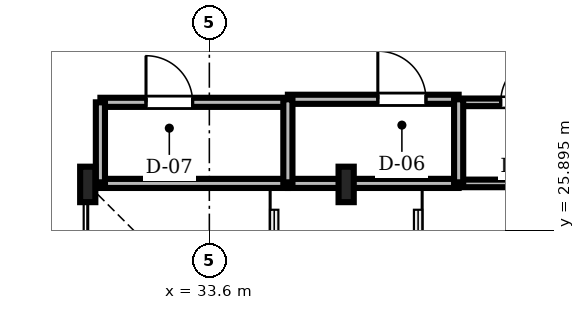
"""IFC4 building model, lengths in metres.
Left out: names, types, materials, properties, quantities, classifications, styles, units other than length and angle.
Written with IfcOpenShell. Run it as: python <this file> out.ifc"""

import sys

from ifc_helpers import new_model, si_unit, direction, frame, frame_2d, origin, origin_2d, place, context, subcontext, project, spatial, rectangle, i_section, extrude, source, transform, mapped, element, fill, save


model = new_model("IFC4")
c1 = context("Model", 3, precision=1e-05, world=origin(), true_north=direction((0.0, 1.0)))
c2 = subcontext(c1, "Body", "Model", "MODEL_VIEW")
j1 = project(units=[si_unit("LENGTHUNIT", "METRE"), si_unit("PLANEANGLEUNIT", "RADIAN")], contexts=[c1])
p1 = place(None, origin())
s1 = spatial("IfcSite", under=j1, at=p1, CompositionType="ELEMENT")
p2 = place(p1, origin())
s2 = spatial("IfcBuilding", under=s1, at=p2, CompositionType="ELEMENT")
p3 = place(p2, frame((0.0, 0.0, 172.2)))
s3 = spatial("IfcBuildingStorey", under=s2, at=p3, CompositionType="ELEMENT", Elevation=172.2)
m1 = source(origin(), c2, "Body", "SweptSolid", [
    extrude(i_section(OverallWidth=0.3, OverallDepth=0.7, WebThickness=0.017, FlangeThickness=0.032, FilletRadius=0.027, at=origin_2d()), origin(), (0.0, 0.0, 1.0), 4.78),
])
for number, where, z_axis, x_axis in (
    (1, (36.3, 26.8, 0.0), (0.0, 0.0, 1.0), (1.0, 0.0, 0.0)),
    (2, (31.2, 26.8, 0.0), (0.0, 0.0, 1.0), (1.0, 0.0, 0.0)),
):
    element("IfcColumn", number, at=place(p3, frame(where, z_axis=z_axis, x_axis=x_axis)), inside=s3, PredefinedType="COLUMN", context=c2, shape_type="MappedRepresentation", body=[
        mapped(m1, transform((0.0, 0.0, 0.0), scale=1.0)),
    ])
m2 = source(origin(), c2, "Body", "SweptSolid", [
    extrude(rectangle(XDim=3.7, YDim=0.18, at=frame_2d((1.85, 0.0))), origin(), (0.0, 0.0, 1.0), 4.412),
])
p4 = place(p3, frame((31.45, 28.42, 0.0), z_axis=(0.0, 0.0, 1.0), x_axis=(1.0, 0.0, 0.0)))
e3 = element("IfcWall", 3, at=p4, inside=s3, PredefinedType="PARTITIONING", context=c2, shape_type="MappedRepresentation", body=[
    mapped(m2, transform((0.0, 0.0, 0.0), scale=1.0)),
])
m3 = source(origin(), c2, "Body", "SweptSolid", [
    extrude(rectangle(XDim=0.92, YDim=2.1, at=frame_2d((0.46, 1.05))), frame((0.0, 0.1, 0.0), z_axis=(0.0, -1.0, 0.0), x_axis=(1.0, 0.0, 0.0)), (0.0, 0.0, 1.0), 0.2),
])
p5 = place(p4, frame((0.9, 0.0, 0.0)))
e4 = element("IfcOpeningElement", 4, at=p5, cuts=e3, PredefinedType="OPENING", context=c2, shape_type="MappedRepresentation", body=[
    mapped(m3, transform((0.0, 0.0, 0.0), scale=1.0)),
])
m4 = source(origin(), c2, "Body", "SweptSolid", [
    extrude(rectangle(XDim=3.37, YDim=0.18, at=frame_2d((1.685, 0.0))), origin(), (0.0, 0.0, 1.0), 4.78),
])
p6 = place(p3, frame((35.15, 28.48, 0.0), z_axis=(0.0, 0.0, 1.0), x_axis=(1.0, 0.0, 0.0)))
e5 = element("IfcWall", 5, at=p6, inside=s3, PredefinedType="PARTITIONING", context=c2, shape_type="MappedRepresentation", body=[
    mapped(m4, transform((0.0, 0.0, 0.0), scale=1.0)),
])
m5 = source(origin(), c2, "Body", "SweptSolid", [
    extrude(rectangle(XDim=0.95, YDim=2.15, at=frame_2d((0.475, 1.075))), frame((0.0, 0.1, 0.0), z_axis=(0.0, -1.0, 0.0), x_axis=(1.0, 0.0, 0.0)), (0.0, 0.0, 1.0), 0.2),
])
p7 = place(p6, frame((1.775, 0.0, 0.0)))
e6 = element("IfcOpeningElement", 6, at=p7, cuts=e5, PredefinedType="OPENING", context=c2, shape_type="MappedRepresentation", body=[
    mapped(m5, transform((0.0, 0.0, 0.0), scale=1.0)),
])
m6 = source(origin(), c2, "Body", "SweptSolid", [
    extrude(rectangle(XDim=3.0, YDim=0.15, at=frame_2d((1.5, 0.0))), origin(), (0.0, 0.0, 1.0), 4.78),
])
p8 = place(p3, frame((38.52, 28.42, 0.0), z_axis=(0.0, 0.0, 1.0), x_axis=(1.0, 0.0, 0.0)))
e7 = element("IfcWall", 7, at=p8, inside=s3, PredefinedType="PARTITIONING", context=c2, shape_type="MappedRepresentation", body=[
    mapped(m6, transform((0.0, 0.0, 0.0), scale=1.0)),
])
m7 = source(origin(), c2, "Body", "SweptSolid", [
    extrude(rectangle(XDim=0.92, YDim=2.1, at=frame_2d((0.46, 1.05))), frame((0.0, 0.085, 0.0), z_axis=(0.0, -1.0, 0.0), x_axis=(1.0, 0.0, 0.0)), (0.0, 0.0, 1.0), 0.17),
])
p9 = place(p8, frame((0.83, 0.0, 0.0)))
e8 = element("IfcOpeningElement", 8, at=p9, cuts=e7, PredefinedType="OPENING", context=c2, shape_type="MappedRepresentation", body=[
    mapped(m7, transform((0.0, 0.0, 0.0), scale=1.0)),
])
m8 = source(origin(), c2, "Body", "SweptSolid", [
    extrude(rectangle(XDim=3.7, YDim=0.18, at=frame_2d((1.85, 0.0))), origin(), (0.0, 0.0, 1.0), 4.322),
])
p10 = place(p3, frame((31.45, 26.82, 0.0), z_axis=(0.0, 0.0, 1.0), x_axis=(1.0, 0.0, 0.0)))
e9 = element("IfcWall", 9, at=p10, inside=s3, PredefinedType="PARTITIONING", context=c2, shape_type="MappedRepresentation", body=[
    mapped(m8, transform((0.0, 0.0, 0.0), scale=1.0)),
])
m9 = source(origin(), c2, "Body", "SweptSolid", [
    extrude(rectangle(XDim=3.37, YDim=0.18, at=frame_2d((1.685, 0.0))), origin(), (0.0, 0.0, 1.0), 4.322),
])
p11 = place(p3, frame((35.15, 26.82, 0.0), z_axis=(0.0, 0.0, 1.0), x_axis=(1.0, 0.0, 0.0)))
e10 = element("IfcWall", 10, at=p11, inside=s3, PredefinedType="PARTITIONING", context=c2, shape_type="MappedRepresentation", body=[
    mapped(m9, transform((0.0, 0.0, 0.0), scale=1.0)),
])
m10 = source(origin(), c2, "Body", "SweptSolid", [
    extrude(rectangle(XDim=3.0, YDim=0.15, at=frame_2d((1.5, 0.0))), origin(), (0.0, 0.0, 1.0), 4.222),
])
p12 = place(p3, frame((38.52, 26.82, 0.0), z_axis=(0.0, 0.0, 1.0), x_axis=(1.0, 0.0, 0.0)))
e11 = element("IfcWall", 11, at=p12, inside=s3, PredefinedType="PARTITIONING", context=c2, shape_type="MappedRepresentation", body=[
    mapped(m10, transform((0.0, 0.0, 0.0), scale=1.0)),
])
m11 = source(origin(), c2, "Body", "SweptSolid", [
    extrude(rectangle(XDim=1.66, YDim=0.18, at=frame_2d((0.83, 0.0))), origin(), (0.0, 0.0, 1.0), 4.322),
])
for number, where, z_axis, x_axis in (
    (12, (35.15, 26.82, 0.0), (0.0, 0.0, 1.0), (0.0, 1.0, 0.0)),
    (13, (38.52, 26.82, 0.0), (0.0, 0.0, 1.0), (0.0, 1.0, 0.0)),
):
    element("IfcWall", number, at=place(p3, frame(where, z_axis=z_axis, x_axis=x_axis)), inside=s3, PredefinedType="PARTITIONING", context=c2, shape_type="MappedRepresentation", body=[
        mapped(m11, transform((0.0, 0.0, 0.0), scale=1.0)),
    ])
m12 = source(origin(), c2, "Body", "SweptSolid", [
    extrude(rectangle(XDim=1.6, YDim=0.18, at=frame_2d((0.8, 0.0))), origin(), (0.0, 0.0, 1.0), 4.322),
])
p13 = place(p3, frame((31.45, 26.82, 0.0), z_axis=(0.0, 0.0, 1.0), x_axis=(0.0, 1.0, 0.0)))
e14 = element("IfcWall", 14, at=p13, inside=s3, PredefinedType="PARTITIONING", context=c2, shape_type="MappedRepresentation", body=[
    mapped(m12, transform((0.0, 0.0, 0.0), scale=1.0)),
])
m13 = source(origin(), c2, "Body", "SweptSolid", [
    extrude(rectangle(XDim=0.92, YDim=2.1, at=frame_2d((0.46, 1.05))), frame((0.0, 0.025, 0.0), z_axis=(0.0, -1.0, 0.0), x_axis=(1.0, 0.0, 0.0)), (0.0, 0.0, 1.0), 0.05),
])
p14 = place(p5, origin())
e15 = element("IfcDoor", 15, at=p14, inside=s3, OperationType="SINGLE_SWING_LEFT", PredefinedType="DOOR", context=c2, shape_type="MappedRepresentation", body=[
    mapped(m13, transform((0.0, 0.0, 0.0), scale=1.0)),
])
fill(e4, e15)
m14 = source(origin(), c2, "Body", "SweptSolid", [
    extrude(rectangle(XDim=0.95, YDim=2.15, at=frame_2d((0.475, 1.075))), frame((0.0, 0.025, 0.0), z_axis=(0.0, -1.0, 0.0), x_axis=(1.0, 0.0, 0.0)), (0.0, 0.0, 1.0), 0.05),
])
p15 = place(p7, origin())
e16 = element("IfcDoor", 16, at=p15, inside=s3, OperationType="SINGLE_SWING_LEFT", PredefinedType="DOOR", context=c2, shape_type="MappedRepresentation", body=[
    mapped(m14, transform((0.0, 0.0, 0.0), scale=1.0)),
])
fill(e6, e16)
p16 = place(p9, origin())
e17 = element("IfcDoor", 17, at=p16, inside=s3, OperationType="SINGLE_SWING_RIGHT", PredefinedType="DOOR", context=c2, shape_type="MappedRepresentation", body=[
    mapped(m13, transform((0.0, 0.0, 0.0), scale=1.0)),
])
fill(e8, e17)
save(model, sys.argv[1])
